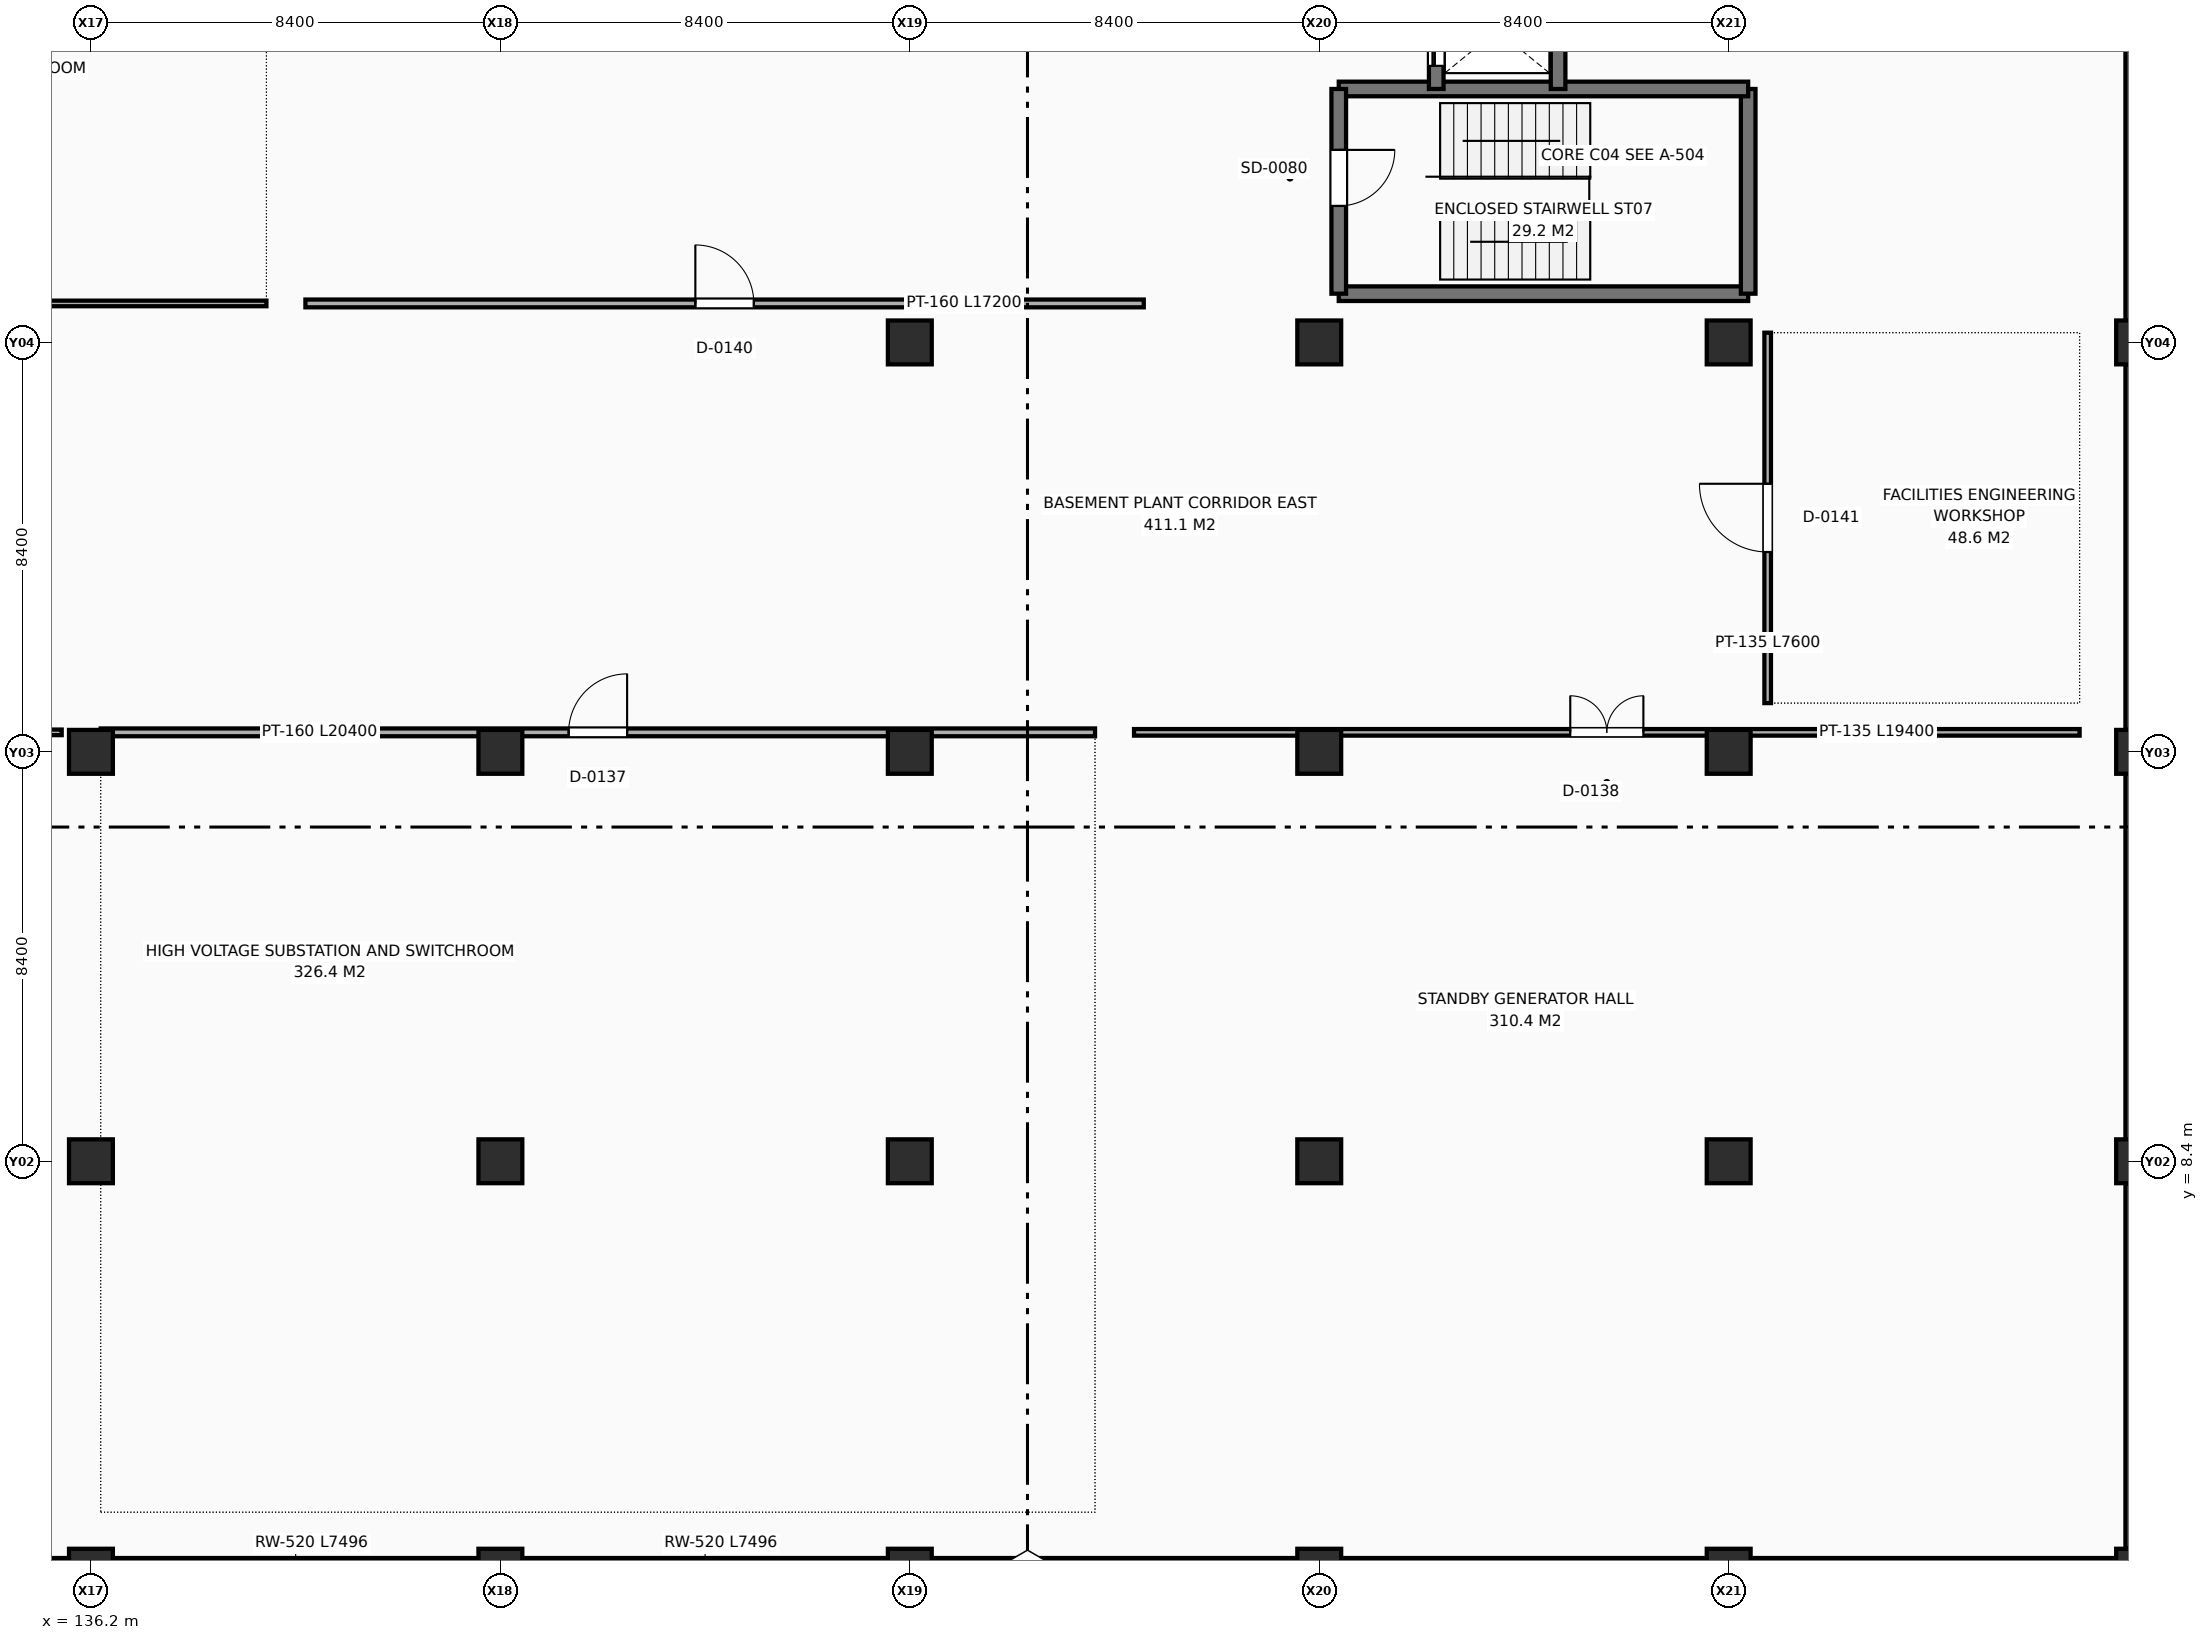
"""IFC4 building model, lengths in metres.
Left out: names, types, materials, properties, quantities, classifications, styles, units other than length and angle.
Written with IfcOpenShell. Run it as: python <this file> out.ifc"""

import sys

from ifc_helpers import new_model, si_unit, direction, frame, frame_2d, origin, origin_2d, place, context, subcontext, project, spatial, rectangle, extrude, element, fill, save


model = new_model("IFC4")
c1 = context("Model", 3, precision=1e-05, world=origin(), true_north=direction((0.0, 1.0)))
c2 = subcontext(c1, "Body", "Model", "MODEL_VIEW")
j1 = project(units=[si_unit("LENGTHUNIT", "METRE"), si_unit("PLANEANGLEUNIT", "RADIAN")], contexts=[c1])
p1 = place(None, origin())
s1 = spatial("IfcSite", under=j1, at=p1, CompositionType="ELEMENT")
p2 = place(p1, origin())
s2 = spatial("IfcBuilding", under=s1, at=p2, CompositionType="ELEMENT")
p3 = place(p2, frame((0.0, 0.0, -4.2)))
s3 = spatial("IfcBuildingStorey", under=s2, at=p3, CompositionType="ELEMENT", Elevation=-4.2)
for number, where, z_axis, x_axis in (
    (1, (136.2, 0.0, 0.0), (0.0, 0.0, 1.0), (1.0, 0.0, 0.0)),
    (2, (136.2, 8.4, 0.0), (0.0, 0.0, 1.0), (1.0, 0.0, 0.0)),
    (3, (136.2, 16.8, 0.0), (0.0, 0.0, 1.0), (1.0, 0.0, 0.0)),
    (4, (144.6, 0.0, 0.0), (0.0, 0.0, 1.0), (1.0, 0.0, 0.0)),
    (5, (144.6, 8.4, 0.0), (0.0, 0.0, 1.0), (1.0, 0.0, 0.0)),
    (6, (144.6, 16.8, 0.0), (0.0, 0.0, 1.0), (1.0, 0.0, 0.0)),
    (7, (153.0, 0.0, 0.0), (0.0, 0.0, 1.0), (1.0, 0.0, 0.0)),
    (8, (153.0, 8.4, 0.0), (0.0, 0.0, 1.0), (1.0, 0.0, 0.0)),
    (9, (153.0, 16.8, 0.0), (0.0, 0.0, 1.0), (1.0, 0.0, 0.0)),
    (10, (153.0, 25.2, 0.0), (0.0, 0.0, 1.0), (1.0, 0.0, 0.0)),
    (11, (161.4, 0.0, 0.0), (0.0, 0.0, 1.0), (1.0, 0.0, 0.0)),
    (12, (161.4, 8.4, 0.0), (0.0, 0.0, 1.0), (1.0, 0.0, 0.0)),
    (13, (161.4, 16.8, 0.0), (0.0, 0.0, 1.0), (1.0, 0.0, 0.0)),
    (14, (161.4, 25.2, 0.0), (0.0, 0.0, 1.0), (1.0, 0.0, 0.0)),
    (15, (169.8, 0.0, 0.0), (0.0, 0.0, 1.0), (1.0, 0.0, 0.0)),
    (16, (169.8, 8.4, 0.0), (0.0, 0.0, 1.0), (1.0, 0.0, 0.0)),
    (17, (169.8, 16.8, 0.0), (0.0, 0.0, 1.0), (1.0, 0.0, 0.0)),
    (18, (169.8, 25.2, 0.0), (0.0, 0.0, 1.0), (1.0, 0.0, 0.0)),
    (19, (178.2, 0.0, 0.0), (0.0, 0.0, 1.0), (1.0, 0.0, 0.0)),
    (20, (178.2, 8.4, 0.0), (0.0, 0.0, 1.0), (1.0, 0.0, 0.0)),
    (21, (178.2, 16.8, 0.0), (0.0, 0.0, 1.0), (1.0, 0.0, 0.0)),
    (22, (178.2, 25.2, 0.0), (0.0, 0.0, 1.0), (1.0, 0.0, 0.0)),
):
    element("IfcColumn", number, at=place(p3, frame(where, z_axis=z_axis, x_axis=x_axis)), inside=s3, PredefinedType="COLUMN", context=c2, shape_type="SweptSolid", body=[
        extrude(rectangle(XDim=0.9, YDim=0.9, at=origin_2d()), origin(), (0.0, 0.0, 1.0), 4.2),
    ])
p4 = place(p3, frame((128.252, 0.0, 0.0), z_axis=(0.0, 0.0, 1.0), x_axis=(1.0, 0.0, 0.0)))
e23 = element("IfcWall", 23, at=p4, inside=s3, PredefinedType="SOLIDWALL", context=c2, shape_type="SweptSolid", body=[
    extrude(rectangle(XDim=7.496, YDim=0.52, at=frame_2d((3.748, 0.0))), origin(), (0.0, 0.0, 1.0), 3.9),
])
p5 = place(p3, frame((136.652, 0.0, 0.0), z_axis=(0.0, 0.0, 1.0), x_axis=(1.0, 0.0, 0.0)))
e24 = element("IfcWall", 24, at=p5, inside=s3, PredefinedType="SOLIDWALL", context=c2, shape_type="SweptSolid", body=[
    extrude(rectangle(XDim=7.496, YDim=0.52, at=frame_2d((3.748, 0.0))), origin(), (0.0, 0.0, 1.0), 3.9),
])
for number, where, z_axis, x_axis in (
    (25, (145.052, 0.0, 0.0), (0.0, 0.0, 1.0), (1.0, 0.0, 0.0)),
    (26, (153.452, 0.0, 0.0), (0.0, 0.0, 1.0), (1.0, 0.0, 0.0)),
):
    element("IfcWall", number, at=place(p3, frame(where, z_axis=z_axis, x_axis=x_axis)), inside=s3, PredefinedType="SOLIDWALL", context=c2, shape_type="SweptSolid", body=[
        extrude(rectangle(XDim=7.496, YDim=0.52, at=frame_2d((3.748, 0.0))), origin(), (0.0, 0.0, 1.0), 3.9),
    ])
p6 = place(p3, frame((161.852, 0.0, 0.0), z_axis=(0.0, 0.0, 1.0), x_axis=(1.0, 0.0, 0.0)))
e27 = element("IfcWall", 27, at=p6, inside=s3, PredefinedType="SOLIDWALL", context=c2, shape_type="SweptSolid", body=[
    extrude(rectangle(XDim=7.496, YDim=0.52, at=frame_2d((3.748, 0.0))), origin(), (0.0, 0.0, 1.0), 3.9),
])
for number, where, z_axis, x_axis in (
    (28, (170.252, 0.0, 0.0), (0.0, 0.0, 1.0), (1.0, 0.0, 0.0)),
    (29, (178.2, 0.452, 0.0), (0.0, 0.0, 1.0), (0.0, 1.0, 0.0)),
):
    element("IfcWall", number, at=place(p3, frame(where, z_axis=z_axis, x_axis=x_axis)), inside=s3, PredefinedType="SOLIDWALL", context=c2, shape_type="SweptSolid", body=[
        extrude(rectangle(XDim=7.496, YDim=0.52, at=frame_2d((3.748, 0.0))), origin(), (0.0, 0.0, 1.0), 3.9),
    ])
p7 = place(p3, frame((178.2, 8.852, 0.0), z_axis=(0.0, 0.0, 1.0), x_axis=(0.0, 1.0, 0.0)))
e30 = element("IfcWall", 30, at=p7, inside=s3, PredefinedType="SOLIDWALL", context=c2, shape_type="SweptSolid", body=[
    extrude(rectangle(XDim=7.496, YDim=0.52, at=frame_2d((3.748, 0.0))), origin(), (0.0, 0.0, 1.0), 3.9),
])
p8 = place(p3, frame((178.2, 17.252, 0.0), z_axis=(0.0, 0.0, 1.0), x_axis=(0.0, 1.0, 0.0)))
e31 = element("IfcWall", 31, at=p8, inside=s3, PredefinedType="SOLIDWALL", context=c2, shape_type="SweptSolid", body=[
    extrude(rectangle(XDim=7.496, YDim=0.52, at=frame_2d((3.748, 0.0))), origin(), (0.0, 0.0, 1.0), 3.9),
])
p9 = place(p3, frame((178.2, 25.652, 0.0), z_axis=(0.0, 0.0, 1.0), x_axis=(0.0, 1.0, 0.0)))
e32 = element("IfcWall", 32, at=p9, inside=s3, PredefinedType="SOLIDWALL", context=c2, shape_type="SweptSolid", body=[
    extrude(rectangle(XDim=7.496, YDim=0.52, at=frame_2d((3.748, 0.0))), origin(), (0.0, 0.0, 1.0), 3.9),
])
p10 = place(p3, frame((161.8, 26.2, 0.0), z_axis=(0.0, 0.0, 1.0), x_axis=(1.0, 0.0, 0.0)))
e33 = element("IfcWall", 33, at=p10, inside=s3, PredefinedType="SHEAR", context=c2, shape_type="SweptSolid", body=[
    extrude(rectangle(XDim=8.4, YDim=0.3, at=frame_2d((4.2, 0.0))), origin(), (0.0, 0.0, 1.0), 3.92),
])
p11 = place(p3, frame((170.2, 26.2, 0.0), z_axis=(0.0, 0.0, 1.0), x_axis=(0.0, 1.0, 0.0)))
e34 = element("IfcWall", 34, at=p11, inside=s3, PredefinedType="SHEAR", context=c2, shape_type="SweptSolid", body=[
    extrude(rectangle(XDim=4.2, YDim=0.3, at=frame_2d((2.1, 0.0))), origin(), (0.0, 0.0, 1.0), 3.92),
])
p12 = place(p3, frame((170.2, 30.4, 0.0), z_axis=(0.0, 0.0, 1.0), x_axis=(-1.0, 0.0, 0.0)))
e35 = element("IfcWall", 35, at=p12, inside=s3, PredefinedType="SHEAR", context=c2, shape_type="SweptSolid", body=[
    extrude(rectangle(XDim=8.4, YDim=0.3, at=frame_2d((4.2, 0.0))), origin(), (0.0, 0.0, 1.0), 3.92),
])
p13 = place(p3, frame((161.8, 30.4, 0.0), z_axis=(0.0, 0.0, 1.0), x_axis=(0.0, -1.0, 0.0)))
e36 = element("IfcWall", 36, at=p13, inside=s3, PredefinedType="SHEAR", context=c2, shape_type="SweptSolid", body=[
    extrude(rectangle(XDim=4.2, YDim=0.3, at=frame_2d((2.1, 0.0))), origin(), (0.0, 0.0, 1.0), 3.92),
])
p14 = place(p13, frame((1.25, 0.0, 0.0)))
e37 = element("IfcOpeningElement", 37, at=p14, cuts=e36, PredefinedType="OPENING", context=c2, shape_type="SweptSolid", body=[
    extrude(rectangle(XDim=1.15, YDim=2.2, at=frame_2d((0.575, 1.1))), frame((0.0, 0.16, 0.0), z_axis=(0.0, -1.0, 0.0), x_axis=(1.0, 0.0, 0.0)), (0.0, 0.0, 1.0), 0.32),
])
p15 = place(p3, frame((163.8, 32.8, 0.0), z_axis=(0.0, 0.0, 1.0), x_axis=(0.0, -1.0, 0.0)))
e38 = element("IfcWall", 38, at=p15, inside=s3, PredefinedType="SHEAR", context=c2, shape_type="SweptSolid", body=[
    extrude(rectangle(XDim=2.4, YDim=0.3, at=frame_2d((1.2, 0.0))), origin(), (0.0, 0.0, 1.0), 3.92),
])
p16 = place(p15, frame((0.475, 0.0, 0.0)))
e39 = element("IfcOpeningElement", 39, at=p16, cuts=e38, PredefinedType="OPENING", context=c2, shape_type="SweptSolid", body=[
    extrude(rectangle(XDim=1.45, YDim=2.35, at=frame_2d((0.725, 1.175))), frame((0.0, 0.16, 0.0), z_axis=(0.0, -1.0, 0.0), x_axis=(1.0, 0.0, 0.0)), (0.0, 0.0, 1.0), 0.32),
])
p17 = place(p3, frame((166.3, 30.4, 0.0), z_axis=(0.0, 0.0, 1.0), x_axis=(0.0, 1.0, 0.0)))
e40 = element("IfcWall", 40, at=p17, inside=s3, PredefinedType="SHEAR", context=c2, shape_type="SweptSolid", body=[
    extrude(rectangle(XDim=2.4, YDim=0.3, at=frame_2d((1.2, 0.0))), origin(), (0.0, 0.0, 1.0), 3.92),
])
p18 = place(p3, frame((112.0, 17.2, 0.0), z_axis=(0.0, 0.0, 1.0), x_axis=(1.0, 0.0, 0.0)))
e41 = element("IfcWall", 41, at=p18, inside=s3, PredefinedType="PARTITIONING", context=c2, shape_type="SweptSolid", body=[
    extrude(rectangle(XDim=23.6, YDim=0.115, at=frame_2d((11.8, 0.0))), origin(), (0.0, 0.0, 1.0), 2.95),
])
p19 = place(p18, frame((11.2, 0.0, 0.0)))
e42 = element("IfcOpeningElement", 42, at=p19, cuts=e41, PredefinedType="OPENING", context=c2, shape_type="SweptSolid", body=[
    extrude(rectangle(XDim=1.2, YDim=2.2, at=frame_2d((0.6, 1.1))), frame((0.0, 0.067, 0.0), z_axis=(0.0, -1.0, 0.0), x_axis=(1.0, 0.0, 0.0)), (0.0, 0.0, 1.0), 0.135),
])
p20 = place(p3, frame((136.4, 17.2, 0.0), z_axis=(0.0, 0.0, 1.0), x_axis=(1.0, 0.0, 0.0)))
e43 = element("IfcWall", 43, at=p20, inside=s3, PredefinedType="PARTITIONING", context=c2, shape_type="SweptSolid", body=[
    extrude(rectangle(XDim=20.4, YDim=0.16, at=frame_2d((10.2, 0.0))), origin(), (0.0, 0.0, 1.0), 2.95),
])
p21 = place(p20, frame((9.6, 0.0, 0.0)))
e44 = element("IfcOpeningElement", 44, at=p21, cuts=e43, PredefinedType="OPENING", context=c2, shape_type="SweptSolid", body=[
    extrude(rectangle(XDim=1.2, YDim=2.2, at=frame_2d((0.6, 1.1))), frame((0.0, 0.09, 0.0), z_axis=(0.0, -1.0, 0.0), x_axis=(1.0, 0.0, 0.0)), (0.0, 0.0, 1.0), 0.18),
])
p22 = place(p3, frame((157.6, 17.2, 0.0), z_axis=(0.0, 0.0, 1.0), x_axis=(1.0, 0.0, 0.0)))
e45 = element("IfcWall", 45, at=p22, inside=s3, PredefinedType="PARTITIONING", context=c2, shape_type="SweptSolid", body=[
    extrude(rectangle(XDim=19.4, YDim=0.135, at=frame_2d((9.7, 0.0))), origin(), (0.0, 0.0, 1.0), 2.95),
])
p23 = place(p22, frame((8.95, 0.0, 0.0)))
e46 = element("IfcOpeningElement", 46, at=p23, cuts=e45, PredefinedType="OPENING", context=c2, shape_type="SweptSolid", body=[
    extrude(rectangle(XDim=1.5, YDim=2.35, at=frame_2d((0.75, 1.175))), frame((0.0, 0.077, 0.0), z_axis=(0.0, -1.0, 0.0), x_axis=(1.0, 0.0, 0.0)), (0.0, 0.0, 1.0), 0.155),
])
p24 = place(p3, frame((112.0, 26.0, 0.0), z_axis=(0.0, 0.0, 1.0), x_axis=(1.0, 0.0, 0.0)))
e47 = element("IfcWall", 47, at=p24, inside=s3, PredefinedType="PARTITIONING", context=c2, shape_type="SweptSolid", body=[
    extrude(rectangle(XDim=27.8, YDim=0.115, at=frame_2d((13.9, 0.0))), origin(), (0.0, 0.0, 1.0), 3.86),
])
p25 = place(p24, frame((13.0, 0.0, 0.0)))
e48 = element("IfcOpeningElement", 48, at=p25, cuts=e47, PredefinedType="OPENING", context=c2, shape_type="SweptSolid", body=[
    extrude(rectangle(XDim=1.8, YDim=2.4, at=frame_2d((0.9, 1.2))), frame((0.0, 0.067, 0.0), z_axis=(0.0, -1.0, 0.0), x_axis=(1.0, 0.0, 0.0)), (0.0, 0.0, 1.0), 0.135),
])
p26 = place(p3, frame((140.6, 26.0, 0.0), z_axis=(0.0, 0.0, 1.0), x_axis=(1.0, 0.0, 0.0)))
e49 = element("IfcWall", 49, at=p26, inside=s3, PredefinedType="PARTITIONING", context=c2, shape_type="SweptSolid", body=[
    extrude(rectangle(XDim=17.2, YDim=0.16, at=frame_2d((8.6, 0.0))), origin(), (0.0, 0.0, 1.0), 3.86),
])
p27 = place(p26, frame((8.0, 0.0, 0.0)))
e50 = element("IfcOpeningElement", 50, at=p27, cuts=e49, PredefinedType="OPENING", context=c2, shape_type="SweptSolid", body=[
    extrude(rectangle(XDim=1.2, YDim=2.2, at=frame_2d((0.6, 1.1))), frame((0.0, 0.09, 0.0), z_axis=(0.0, -1.0, 0.0), x_axis=(1.0, 0.0, 0.0)), (0.0, 0.0, 1.0), 0.18),
])
p28 = place(p3, frame((170.6, 17.8, 0.0), z_axis=(0.0, 0.0, 1.0), x_axis=(0.0, 1.0, 0.0)))
e51 = element("IfcWall", 51, at=p28, inside=s3, PredefinedType="PARTITIONING", context=c2, shape_type="SweptSolid", body=[
    extrude(rectangle(XDim=7.6, YDim=0.135, at=frame_2d((3.8, 0.0))), origin(), (0.0, 0.0, 1.0), 3.86),
])
p29 = place(p28, frame((3.1, 0.0, 0.0)))
e52 = element("IfcOpeningElement", 52, at=p29, cuts=e51, PredefinedType="OPENING", context=c2, shape_type="SweptSolid", body=[
    extrude(rectangle(XDim=1.4, YDim=2.25, at=frame_2d((0.7, 1.125))), frame((0.0, 0.077, 0.0), z_axis=(0.0, -1.0, 0.0), x_axis=(1.0, 0.0, 0.0)), (0.0, 0.0, 1.0), 0.155),
])
p30 = place(p14, origin())
e53 = element("IfcDoor", 53, at=p30, inside=s3, OperationType="SINGLE_SWING_LEFT", PredefinedType="DOOR", context=c2, shape_type="SweptSolid", body=[
    extrude(rectangle(XDim=1.15, YDim=2.2, at=frame_2d((0.575, 1.1))), frame((0.0, 0.025, 0.0), z_axis=(0.0, -1.0, 0.0), x_axis=(1.0, 0.0, 0.0)), (0.0, 0.0, 1.0), 0.05),
])
fill(e37, e53)
p31 = place(p16, origin())
e54 = element("IfcDoor", 54, at=p31, inside=s3, OperationType="SLIDING_TO_LEFT", PredefinedType="DOOR", context=c2, shape_type="SweptSolid", body=[
    extrude(rectangle(XDim=1.45, YDim=2.35, at=frame_2d((0.725, 1.175))), frame((0.0, 0.025, 0.0), z_axis=(0.0, -1.0, 0.0), x_axis=(1.0, 0.0, 0.0)), (0.0, 0.0, 1.0), 0.05),
])
fill(e39, e54)
p32 = place(p21, origin())
e55 = element("IfcDoor", 55, at=p32, inside=s3, OperationType="SINGLE_SWING_RIGHT", PredefinedType="DOOR", context=c2, shape_type="SweptSolid", body=[
    extrude(rectangle(XDim=1.2, YDim=2.2, at=frame_2d((0.6, 1.1))), frame((0.0, 0.025, 0.0), z_axis=(0.0, -1.0, 0.0), x_axis=(1.0, 0.0, 0.0)), (0.0, 0.0, 1.0), 0.05),
])
fill(e44, e55)
p33 = place(p23, origin())
e56 = element("IfcDoor", 56, at=p33, inside=s3, OperationType="DOUBLE_DOOR_SINGLE_SWING", PredefinedType="DOOR", context=c2, shape_type="SweptSolid", body=[
    extrude(rectangle(XDim=1.5, YDim=2.35, at=frame_2d((0.75, 1.175))), frame((0.0, 0.025, 0.0), z_axis=(0.0, -1.0, 0.0), x_axis=(1.0, 0.0, 0.0)), (0.0, 0.0, 1.0), 0.05),
])
fill(e46, e56)
p34 = place(p27, origin())
e57 = element("IfcDoor", 57, at=p34, inside=s3, OperationType="SINGLE_SWING_LEFT", PredefinedType="DOOR", context=c2, shape_type="SweptSolid", body=[
    extrude(rectangle(XDim=1.2, YDim=2.2, at=frame_2d((0.6, 1.1))), frame((0.0, 0.025, 0.0), z_axis=(0.0, -1.0, 0.0), x_axis=(1.0, 0.0, 0.0)), (0.0, 0.0, 1.0), 0.05),
])
fill(e50, e57)
p35 = place(p29, origin())
e58 = element("IfcDoor", 58, at=p35, inside=s3, OperationType="SINGLE_SWING_RIGHT", PredefinedType="DOOR", context=c2, shape_type="SweptSolid", body=[
    extrude(rectangle(XDim=1.4, YDim=2.25, at=frame_2d((0.7, 1.125))), frame((0.0, 0.025, 0.0), z_axis=(0.0, -1.0, 0.0), x_axis=(1.0, 0.0, 0.0)), (0.0, 0.0, 1.0), 0.05),
])
fill(e52, e58)
save(model, sys.argv[1])
